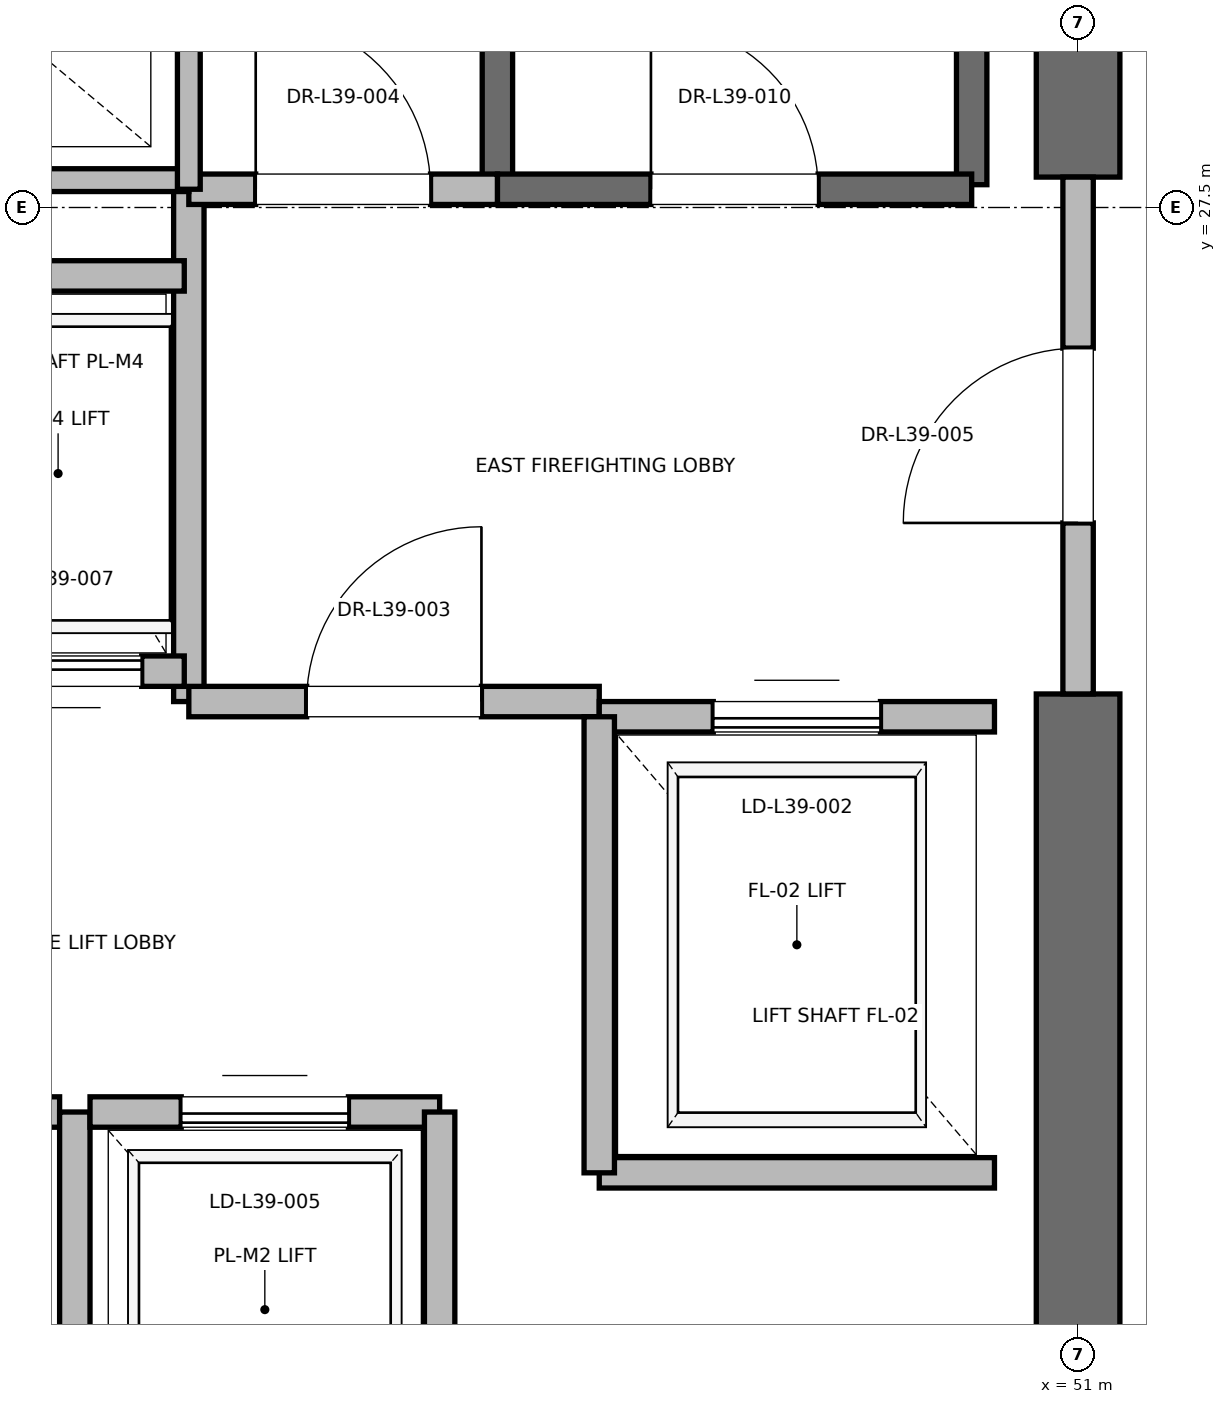
"""IFC4 building model, lengths in metres.
Left out: names, types, materials, properties, quantities, classifications, styles, units other than length and angle.
Written with IfcOpenShell. Run it as: python <this file> out.ifc"""

import sys

from ifc_helpers import new_model, si_unit, direction, frame, frame_2d, origin, place, context, subcontext, project, spatial, rectangle, extrude, element, fill, save


model = new_model("IFC4")
c1 = context("Model", 3, precision=1e-05, world=origin(), true_north=direction((0.0, 1.0)))
c2 = subcontext(c1, "Body", "Model", "MODEL_VIEW")
j1 = project(units=[si_unit("LENGTHUNIT", "METRE"), si_unit("PLANEANGLEUNIT", "RADIAN")], contexts=[c1])
p1 = place(None, origin())
s1 = spatial("IfcSite", under=j1, at=p1, CompositionType="ELEMENT")
p2 = place(p1, origin())
s2 = spatial("IfcBuilding", under=s1, at=p2, CompositionType="ELEMENT")
p3 = place(p2, frame((0.0, 0.0, 168.4)))
s3 = spatial("IfcBuildingStorey", under=s2, at=p3, CompositionType="ELEMENT", Elevation=168.4)
p4 = place(p3, frame((51.0, 18.5, 0.0), z_axis=(0.0, 0.0, 1.0), x_axis=(0.0, 1.0, 0.0)))
e1 = element("IfcWall", 1, at=p4, inside=s3, PredefinedType="SHEAR", context=c2, shape_type="SweptSolid", body=[
    extrude(rectangle(XDim=5.8, YDim=0.55, at=frame_2d((2.9, 0.0))), origin(), (0.0, 0.0, 1.0), 3.775),
])
p5 = place(p3, frame((51.0, 27.7, 0.0), z_axis=(0.0, 0.0, 1.0), x_axis=(0.0, 1.0, 0.0)))
e2 = element("IfcWall", 2, at=p5, inside=s3, PredefinedType="SHEAR", context=c2, shape_type="SweptSolid", body=[
    extrude(rectangle(XDim=8.8, YDim=0.55, at=frame_2d((4.4, 0.0))), origin(), (0.0, 0.0, 1.0), 3.775),
])
p6 = place(p3, frame((50.3, 27.65, 0.0), z_axis=(0.0, 0.0, 1.0), x_axis=(0.0, 1.0, 0.0)))
e3 = element("IfcWall", 3, at=p6, inside=s3, PredefinedType="SOLIDWALL", context=c2, shape_type="SweptSolid", body=[
    extrude(rectangle(XDim=8.15, YDim=0.2, at=frame_2d((4.075, 0.0))), origin(), (0.0, 0.0, 1.0), 3.775),
])
p7 = place(p3, frame((47.18, 27.62, 0.0), z_axis=(0.0, 0.0, 1.0), x_axis=(0.0, 1.0, 0.0)))
e4 = element("IfcWall", 4, at=p7, inside=s3, PredefinedType="SOLIDWALL", context=c2, shape_type="SweptSolid", body=[
    extrude(rectangle(XDim=8.18, YDim=0.2, at=frame_2d((4.09, 0.0))), origin(), (0.0, 0.0, 1.0), 3.775),
])
p8 = place(p3, frame((47.18, 27.62, 0.0), z_axis=(0.0, 0.0, 1.0), x_axis=(1.0, 0.0, 0.0)))
e5 = element("IfcWall", 5, at=p8, inside=s3, PredefinedType="SOLIDWALL", context=c2, shape_type="SweptSolid", body=[
    extrude(rectangle(XDim=3.12, YDim=0.2, at=frame_2d((1.56, 0.0))), origin(), (0.0, 0.0, 1.0), 3.775),
])
p9 = place(p8, frame((1.01, 0.0, 0.0)))
e6 = element("IfcOpeningElement", 6, at=p9, cuts=e5, PredefinedType="OPENING", context=c2, shape_type="SweptSolid", body=[
    extrude(rectangle(XDim=1.1, YDim=2.15, at=frame_2d((0.55, 1.075))), frame((0.0, 0.1, 0.0), z_axis=(0.0, -1.0, 0.0), x_axis=(1.0, 0.0, 0.0)), (0.0, 0.0, 1.0), 0.2),
])
p10 = place(p3, frame((45.15, 24.25, 0.0), z_axis=(0.0, 0.0, 1.0), x_axis=(0.0, 1.0, 0.0)))
e7 = element("IfcWall", 7, at=p10, inside=s3, PredefinedType="PARTITIONING", context=c2, shape_type="SweptSolid", body=[
    extrude(rectangle(XDim=3.37, YDim=0.2, at=frame_2d((1.685, 0.0))), origin(), (0.0, 0.0, 1.0), 3.775),
])
p11 = place(p3, frame((45.15, 24.25, 0.0), z_axis=(0.0, 0.0, 1.0), x_axis=(1.0, 0.0, 0.0)))
e8 = element("IfcWall", 8, at=p11, inside=s3, PredefinedType="PARTITIONING", context=c2, shape_type="SweptSolid", body=[
    extrude(rectangle(XDim=2.7, YDim=0.2, at=frame_2d((1.35, 0.0))), origin(), (0.0, 0.0, 1.0), 3.775),
])
p12 = place(p11, frame((0.775, 0.0, 0.0)))
e9 = element("IfcOpeningElement", 9, at=p12, cuts=e8, PredefinedType="OPENING", context=c2, shape_type="SweptSolid", body=[
    extrude(rectangle(XDim=1.15, YDim=2.2, at=frame_2d((0.575, 1.1))), frame((0.0, 0.1, 0.0), z_axis=(0.0, -1.0, 0.0), x_axis=(1.0, 0.0, 0.0)), (0.0, 0.0, 1.0), 0.2),
])
p13 = place(p3, frame((45.15, 27.62, 0.0), z_axis=(0.0, 0.0, 1.0), x_axis=(1.0, 0.0, 0.0)))
e10 = element("IfcWall", 10, at=p13, inside=s3, PredefinedType="PARTITIONING", context=c2, shape_type="SweptSolid", body=[
    extrude(rectangle(XDim=2.03, YDim=0.2, at=frame_2d((1.015, 0.0))), origin(), (0.0, 0.0, 1.0), 3.775),
])
p14 = place(p13, frame((0.44, 0.0, 0.0)))
e11 = element("IfcOpeningElement", 11, at=p14, cuts=e10, PredefinedType="OPENING", context=c2, shape_type="SweptSolid", body=[
    extrude(rectangle(XDim=1.15, YDim=2.2, at=frame_2d((0.575, 1.1))), frame((0.0, 0.1, 0.0), z_axis=(0.0, -1.0, 0.0), x_axis=(1.0, 0.0, 0.0)), (0.0, 0.0, 1.0), 0.2),
])
p15 = place(p3, frame((51.0, 24.3, 0.0), z_axis=(0.0, 0.0, 1.0), x_axis=(0.0, 1.0, 0.0)))
e12 = element("IfcWall", 12, at=p15, inside=s3, PredefinedType="PARTITIONING", context=c2, shape_type="SweptSolid", body=[
    extrude(rectangle(XDim=3.4, YDim=0.2, at=frame_2d((1.7, 0.0))), origin(), (0.0, 0.0, 1.0), 2.755),
])
p16 = place(p15, frame((1.125, 0.0, 0.0)))
e13 = element("IfcOpeningElement", 13, at=p16, cuts=e12, PredefinedType="OPENING", context=c2, shape_type="SweptSolid", body=[
    extrude(rectangle(XDim=1.15, YDim=2.2, at=frame_2d((0.575, 1.1))), frame((0.0, 0.1, 0.0), z_axis=(0.0, -1.0, 0.0), x_axis=(1.0, 0.0, 0.0)), (0.0, 0.0, 1.0), 0.2),
])
p17 = place(p3, frame((47.85, 21.15, 0.0), z_axis=(0.0, 0.0, 1.0), x_axis=(1.0, 0.0, 0.0)))
e14 = element("IfcWall", 14, at=p17, inside=s3, PredefinedType="SOLIDWALL", context=c2, shape_type="SweptSolid", body=[
    extrude(rectangle(XDim=2.6, YDim=0.2, at=frame_2d((1.3, 0.0))), origin(), (0.0, 0.0, 1.0), 3.775),
])
p18 = place(p3, frame((50.45, 24.15, 0.0), z_axis=(0.0, 0.0, 1.0), x_axis=(-1.0, 0.0, 0.0)))
e15 = element("IfcWall", 15, at=p18, inside=s3, PredefinedType="SOLIDWALL", context=c2, shape_type="SweptSolid", body=[
    extrude(rectangle(XDim=2.6, YDim=0.2, at=frame_2d((1.3, 0.0))), origin(), (0.0, 0.0, 1.0), 2.755),
])
p19 = place(p18, frame((0.75, 0.0, 0.0)))
e16 = element("IfcOpeningElement", 16, at=p19, cuts=e15, PredefinedType="OPENING", context=c2, shape_type="SweptSolid", body=[
    extrude(rectangle(XDim=1.1, YDim=2.2, at=frame_2d((0.55, 1.1))), frame((0.0, 0.1, 0.0), z_axis=(0.0, -1.0, 0.0), x_axis=(1.0, 0.0, 0.0)), (0.0, 0.0, 1.0), 0.2),
])
p20 = place(p3, frame((47.85, 24.15, 0.0), z_axis=(0.0, 0.0, 1.0), x_axis=(0.0, -1.0, 0.0)))
e17 = element("IfcWall", 17, at=p20, inside=s3, PredefinedType="SOLIDWALL", context=c2, shape_type="SweptSolid", body=[
    extrude(rectangle(XDim=3.0, YDim=0.2, at=frame_2d((1.5, 0.0))), origin(), (0.0, 0.0, 1.0), 3.775),
])
p21 = place(p3, frame((44.3, 21.55, 0.0), z_axis=(0.0, 0.0, 1.0), x_axis=(-1.0, 0.0, 0.0)))
e18 = element("IfcWall", 18, at=p21, inside=s3, PredefinedType="SOLIDWALL", context=c2, shape_type="SweptSolid", body=[
    extrude(rectangle(XDim=2.3, YDim=0.2, at=frame_2d((1.15, 0.0))), origin(), (0.0, 0.0, 1.0), 3.775),
])
p22 = place(p21, frame((0.6, 0.0, 0.0)))
e19 = element("IfcOpeningElement", 19, at=p22, cuts=e18, PredefinedType="OPENING", context=c2, shape_type="SweptSolid", body=[
    extrude(rectangle(XDim=1.1, YDim=2.2, at=frame_2d((0.55, 1.1))), frame((0.0, 0.1, 0.0), z_axis=(0.0, -1.0, 0.0), x_axis=(1.0, 0.0, 0.0)), (0.0, 0.0, 1.0), 0.2),
])
p23 = place(p3, frame((44.4, 18.95, 0.0), z_axis=(0.0, 0.0, 1.0), x_axis=(0.0, 1.0, 0.0)))
e20 = element("IfcWall", 20, at=p23, inside=s3, PredefinedType="SOLIDWALL", context=c2, shape_type="SweptSolid", body=[
    extrude(rectangle(XDim=2.6, YDim=0.2, at=frame_2d((1.3, 0.0))), origin(), (0.0, 0.0, 1.0), 3.775),
])
p24 = place(p3, frame((46.8, 21.55, 0.0), z_axis=(0.0, 0.0, 1.0), x_axis=(-1.0, 0.0, 0.0)))
e21 = element("IfcWall", 21, at=p24, inside=s3, PredefinedType="SOLIDWALL", context=c2, shape_type="SweptSolid", body=[
    extrude(rectangle(XDim=2.3, YDim=0.2, at=frame_2d((1.15, 0.0))), origin(), (0.0, 0.0, 1.0), 3.775),
])
p25 = place(p24, frame((0.6, 0.0, 0.0)))
e22 = element("IfcOpeningElement", 22, at=p25, cuts=e21, PredefinedType="OPENING", context=c2, shape_type="SweptSolid", body=[
    extrude(rectangle(XDim=1.1, YDim=2.2, at=frame_2d((0.55, 1.1))), frame((0.0, 0.1, 0.0), z_axis=(0.0, -1.0, 0.0), x_axis=(1.0, 0.0, 0.0)), (0.0, 0.0, 1.0), 0.2),
])
p26 = place(p3, frame((46.8, 18.95, 0.0), z_axis=(0.0, 0.0, 1.0), x_axis=(0.0, 1.0, 0.0)))
e23 = element("IfcWall", 23, at=p26, inside=s3, PredefinedType="SOLIDWALL", context=c2, shape_type="SweptSolid", body=[
    extrude(rectangle(XDim=2.6, YDim=0.2, at=frame_2d((1.3, 0.0))), origin(), (0.0, 0.0, 1.0), 3.775),
])
p27 = place(p3, frame((43.46, 24.45, 0.0), z_axis=(0.0, 0.0, 1.0), x_axis=(1.0, 0.0, 0.0)))
e24 = element("IfcWall", 24, at=p27, inside=s3, PredefinedType="SOLIDWALL", context=c2, shape_type="SweptSolid", body=[
    extrude(rectangle(XDim=1.66, YDim=0.2, at=frame_2d((0.83, 0.0))), origin(), (0.0, 0.0, 1.0), 3.775),
])
p28 = place(p27, frame((0.28, 0.0, 0.0)))
e25 = element("IfcOpeningElement", 25, at=p28, cuts=e24, PredefinedType="OPENING", context=c2, shape_type="SweptSolid", body=[
    extrude(rectangle(XDim=1.1, YDim=2.2, at=frame_2d((0.55, 1.1))), frame((0.0, 0.1, 0.0), z_axis=(0.0, -1.0, 0.0), x_axis=(1.0, 0.0, 0.0)), (0.0, 0.0, 1.0), 0.2),
])
p29 = place(p3, frame((45.12, 27.05, 0.0), z_axis=(0.0, 0.0, 1.0), x_axis=(-1.0, 0.0, 0.0)))
e26 = element("IfcWall", 26, at=p29, inside=s3, PredefinedType="SOLIDWALL", context=c2, shape_type="SweptSolid", body=[
    extrude(rectangle(XDim=1.66, YDim=0.2, at=frame_2d((0.83, 0.0))), origin(), (0.0, 0.0, 1.0), 3.775),
])
p30 = place(p3, frame((41.56, 27.68, 0.0), z_axis=(0.0, 0.0, 1.0), x_axis=(1.0, 0.0, 0.0)))
e27 = element("IfcWall", 27, at=p30, inside=s3, PredefinedType="PARTITIONING", context=c2, shape_type="SweptSolid", body=[
    extrude(rectangle(XDim=3.59, YDim=0.15, at=frame_2d((1.795, 0.0))), origin(), (0.0, 0.0, 1.0), 2.85),
])
p31 = place(p3, frame((45.15, 27.62, 0.0), z_axis=(0.0, 0.0, 1.0), x_axis=(0.0, 1.0, 0.0)))
e28 = element("IfcWall", 28, at=p31, inside=s3, PredefinedType="PARTITIONING", context=c2, shape_type="SweptSolid", body=[
    extrude(rectangle(XDim=3.1, YDim=0.15, at=frame_2d((1.55, 0.0))), origin(), (0.0, 0.0, 1.0), 2.85),
])
p32 = place(p9, origin())
e29 = element("IfcDoor", 29, at=p32, inside=s3, OperationType="SINGLE_SWING_LEFT", PredefinedType="DOOR", context=c2, shape_type="SweptSolid", body=[
    extrude(rectangle(XDim=1.1, YDim=2.15, at=frame_2d((0.55, 1.075))), frame((0.0, 0.025, 0.0), z_axis=(0.0, -1.0, 0.0), x_axis=(1.0, 0.0, 0.0)), (0.0, 0.0, 1.0), 0.05),
])
fill(e6, e29)
p33 = place(p12, origin())
e30 = element("IfcDoor", 30, at=p33, inside=s3, OperationType="SINGLE_SWING_RIGHT", PredefinedType="DOOR", context=c2, shape_type="SweptSolid", body=[
    extrude(rectangle(XDim=1.15, YDim=2.2, at=frame_2d((0.575, 1.1))), frame((0.0, 0.025, 0.0), z_axis=(0.0, -1.0, 0.0), x_axis=(1.0, 0.0, 0.0)), (0.0, 0.0, 1.0), 0.05),
])
fill(e9, e30)
p34 = place(p14, origin())
e31 = element("IfcDoor", 31, at=p34, inside=s3, OperationType="SINGLE_SWING_LEFT", PredefinedType="DOOR", context=c2, shape_type="SweptSolid", body=[
    extrude(rectangle(XDim=1.15, YDim=2.2, at=frame_2d((0.575, 1.1))), frame((0.0, 0.025, 0.0), z_axis=(0.0, -1.0, 0.0), x_axis=(1.0, 0.0, 0.0)), (0.0, 0.0, 1.0), 0.05),
])
fill(e11, e31)
p35 = place(p16, origin())
e32 = element("IfcDoor", 32, at=p35, inside=s3, OperationType="SINGLE_SWING_LEFT", PredefinedType="DOOR", context=c2, shape_type="SweptSolid", body=[
    extrude(rectangle(XDim=1.15, YDim=2.2, at=frame_2d((0.575, 1.1))), frame((0.0, 0.025, 0.0), z_axis=(0.0, -1.0, 0.0), x_axis=(1.0, 0.0, 0.0)), (0.0, 0.0, 1.0), 0.05),
])
fill(e13, e32)
p36 = place(p19, origin())
e33 = element("IfcDoor", 33, at=p36, inside=s3, OperationType="SLIDING_TO_RIGHT", PredefinedType="DOOR", context=c2, shape_type="SweptSolid", body=[
    extrude(rectangle(XDim=1.1, YDim=2.2, at=frame_2d((0.55, 1.1))), frame((0.0, 0.025, 0.0), z_axis=(0.0, -1.0, 0.0), x_axis=(1.0, 0.0, 0.0)), (0.0, 0.0, 1.0), 0.05),
])
fill(e16, e33)
p37 = place(p25, origin())
e34 = element("IfcDoor", 34, at=p37, inside=s3, OperationType="SLIDING_TO_RIGHT", PredefinedType="DOOR", context=c2, shape_type="SweptSolid", body=[
    extrude(rectangle(XDim=1.1, YDim=2.2, at=frame_2d((0.55, 1.1))), frame((0.0, 0.025, 0.0), z_axis=(0.0, -1.0, 0.0), x_axis=(1.0, 0.0, 0.0)), (0.0, 0.0, 1.0), 0.05),
])
fill(e22, e34)
p38 = place(p28, origin())
e35 = element("IfcDoor", 35, at=p38, inside=s3, OperationType="SLIDING_TO_RIGHT", PredefinedType="DOOR", context=c2, shape_type="SweptSolid", body=[
    extrude(rectangle(XDim=1.1, YDim=2.2, at=frame_2d((0.55, 1.1))), frame((0.0, 0.025, 0.0), z_axis=(0.0, -1.0, 0.0), x_axis=(1.0, 0.0, 0.0)), (0.0, 0.0, 1.0), 0.05),
])
fill(e25, e35)
save(model, sys.argv[1])
